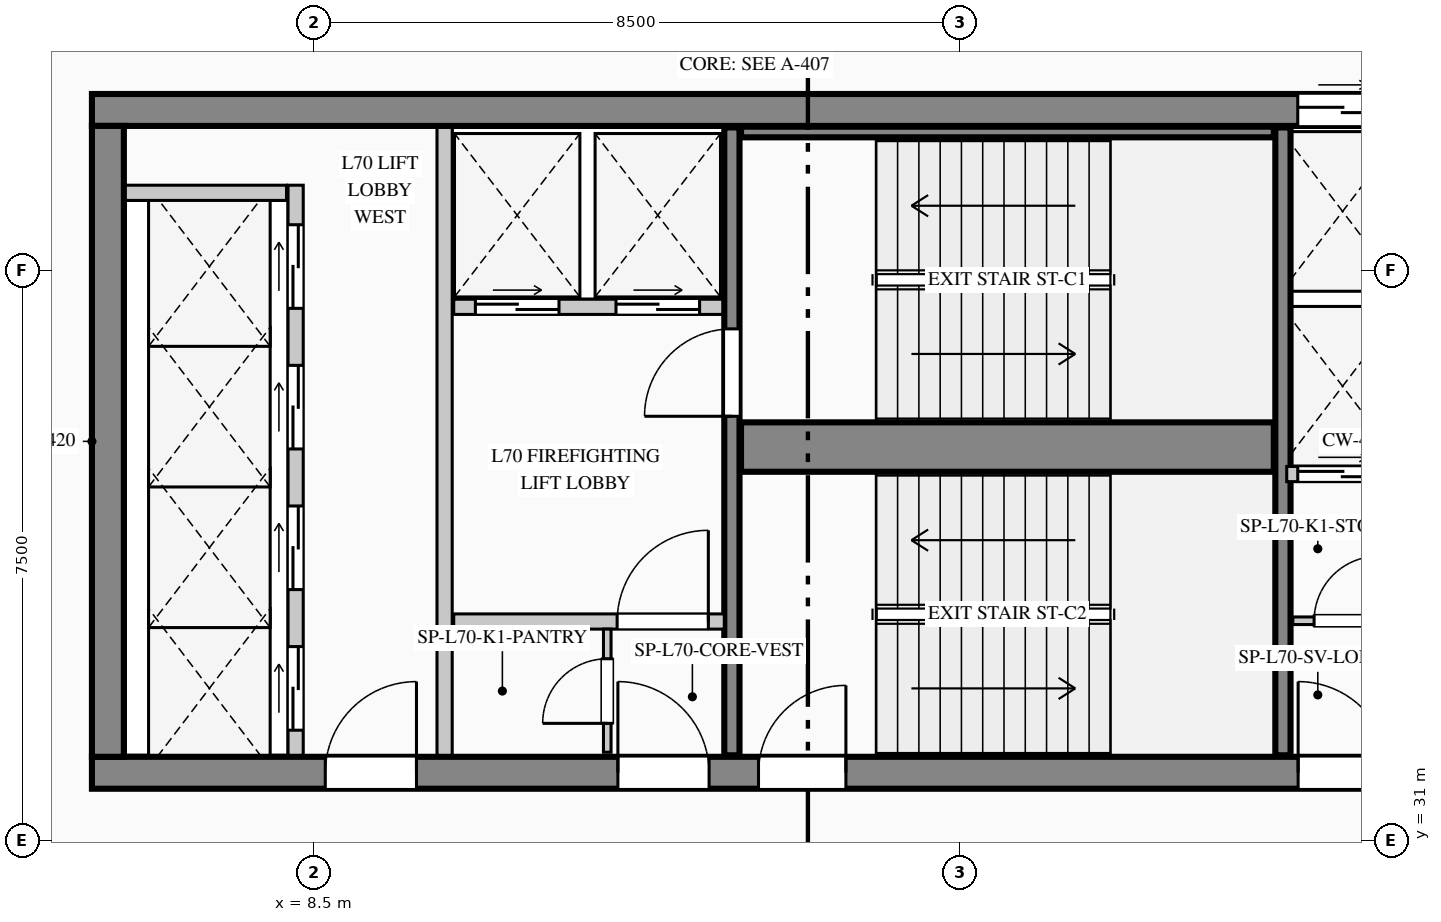
"""IFC4 building model, lengths in metres.
Left out: names, types, materials, properties, quantities, classifications, styles, units other than length and angle.
Written with IfcOpenShell. Run it as: python <this file> out.ifc"""

import sys

from ifc_helpers import new_model, si_unit, direction, frame, frame_2d, origin, place, context, subcontext, project, spatial, rectangle, extrude, element, fill, save


model = new_model("IFC4")
c1 = context("Model", 3, precision=1e-05, world=origin(), true_north=direction((0.0, 1.0)))
c2 = subcontext(c1, "Body", "Model", "MODEL_VIEW")
j1 = project(units=[si_unit("LENGTHUNIT", "METRE"), si_unit("PLANEANGLEUNIT", "RADIAN")], contexts=[c1])
p1 = place(None, origin())
s1 = spatial("IfcSite", under=j1, at=p1, CompositionType="ELEMENT")
p2 = place(p1, origin())
s2 = spatial("IfcBuilding", under=s1, at=p2, CompositionType="ELEMENT")
p3 = place(p2, frame((0.0, 0.0, 292.25)))
s3 = spatial("IfcBuildingStorey", under=s2, at=p3, CompositionType="ELEMENT", Elevation=292.25)
p4 = place(p3, frame((5.58, 40.61, 0.0), z_axis=(0.0, 0.0, 1.0), x_axis=(1.0, 0.0, 0.0)))
e1 = element("IfcWall", 1, at=p4, inside=s3, PredefinedType="SHEAR", context=c2, shape_type="SweptSolid", body=[
    extrude(rectangle(XDim=17.69, YDim=0.42, at=frame_2d((8.845, 0.0))), origin(), (0.0, 0.0, 1.0), 3.95),
])
p5 = place(p4, frame((15.865, 0.0, 0.0)))
e2 = element("IfcOpeningElement", 2, at=p5, cuts=e1, PredefinedType="OPENING", context=c2, shape_type="SweptSolid", body=[
    extrude(rectangle(XDim=1.18, YDim=2.25, at=frame_2d((0.59, 1.125))), frame((0.0, 0.22, 0.0), z_axis=(0.0, -1.0, 0.0), x_axis=(1.0, 0.0, 0.0)), (0.0, 0.0, 1.0), 0.44),
])
p6 = place(p3, frame((5.58, 31.89, 0.0), z_axis=(0.0, 0.0, 1.0), x_axis=(1.0, 0.0, 0.0)))
e3 = element("IfcWall", 3, at=p6, inside=s3, PredefinedType="SHEAR", context=c2, shape_type="SweptSolid", body=[
    extrude(rectangle(XDim=17.69, YDim=0.42, at=frame_2d((8.845, 0.0))), origin(), (0.0, 0.0, 1.0), 3.95),
])
p7 = place(p6, frame((3.07, 0.0, 0.0)))
e4 = element("IfcOpeningElement", 4, at=p7, cuts=e3, PredefinedType="OPENING", context=c2, shape_type="SweptSolid", body=[
    extrude(rectangle(XDim=1.2, YDim=2.2, at=frame_2d((0.6, 1.1))), frame((0.0, 0.22, 0.0), z_axis=(0.0, -1.0, 0.0), x_axis=(1.0, 0.0, 0.0)), (0.0, 0.0, 1.0), 0.44),
])
p8 = place(p6, frame((6.92, 0.0, 0.0)))
e5 = element("IfcOpeningElement", 5, at=p8, cuts=e3, PredefinedType="OPENING", context=c2, shape_type="SweptSolid", body=[
    extrude(rectangle(XDim=1.2, YDim=2.2, at=frame_2d((0.6, 1.1))), frame((0.0, 0.22, 0.0), z_axis=(0.0, -1.0, 0.0), x_axis=(1.0, 0.0, 0.0)), (0.0, 0.0, 1.0), 0.44),
])
p9 = place(p6, frame((8.77, 0.0, 0.0)))
e6 = element("IfcOpeningElement", 6, at=p9, cuts=e3, PredefinedType="OPENING", context=c2, shape_type="SweptSolid", body=[
    extrude(rectangle(XDim=1.15, YDim=2.2, at=frame_2d((0.575, 1.1))), frame((0.0, 0.22, 0.0), z_axis=(0.0, -1.0, 0.0), x_axis=(1.0, 0.0, 0.0)), (0.0, 0.0, 1.0), 0.44),
])
p10 = place(p6, frame((15.87, 0.0, 0.0)))
e7 = element("IfcOpeningElement", 7, at=p10, cuts=e3, PredefinedType="OPENING", context=c2, shape_type="SweptSolid", body=[
    extrude(rectangle(XDim=1.2, YDim=2.2, at=frame_2d((0.6, 1.1))), frame((0.0, 0.22, 0.0), z_axis=(0.0, -1.0, 0.0), x_axis=(1.0, 0.0, 0.0)), (0.0, 0.0, 1.0), 0.44),
])
p11 = place(p3, frame((5.79, 32.1, 0.0), z_axis=(0.0, 0.0, 1.0), x_axis=(0.0, 1.0, 0.0)))
e8 = element("IfcWall", 8, at=p11, inside=s3, PredefinedType="SHEAR", context=c2, shape_type="SweptSolid", body=[
    extrude(rectangle(XDim=8.3, YDim=0.42, at=frame_2d((4.15, 0.0))), origin(), (0.0, 0.0, 1.0), 3.95),
])
p12 = place(p3, frame((14.0, 32.12, 0.0), z_axis=(0.0, 0.0, 1.0), x_axis=(0.0, 1.0, 0.0)))
e9 = element("IfcWall", 9, at=p12, inside=s3, PredefinedType="SHEAR", context=c2, shape_type="SweptSolid", body=[
    extrude(rectangle(XDim=8.26, YDim=0.2, at=frame_2d((4.13, 0.0))), origin(), (0.0, 0.0, 1.0), 3.95),
])
p13 = place(p12, frame((4.46, 0.0, 0.0)))
e10 = element("IfcOpeningElement", 10, at=p13, cuts=e9, PredefinedType="OPENING", context=c2, shape_type="SweptSolid", body=[
    extrude(rectangle(XDim=1.15, YDim=2.2, at=frame_2d((0.575, 1.1))), frame((0.0, 0.11, 0.0), z_axis=(0.0, -1.0, 0.0), x_axis=(1.0, 0.0, 0.0)), (0.0, 0.0, 1.0), 0.22),
])
p14 = place(p3, frame((14.12, 36.175, 0.0), z_axis=(0.0, 0.0, 1.0), x_axis=(1.0, 0.0, 0.0)))
e11 = element("IfcWall", 11, at=p14, inside=s3, PredefinedType="SHEAR", context=c2, shape_type="SweptSolid", body=[
    extrude(rectangle(XDim=7.01, YDim=0.65, at=frame_2d((3.505, 0.0))), origin(), (0.0, 0.0, 1.0), 3.95),
])
p15 = place(p3, frame((21.25, 32.12, 0.0), z_axis=(0.0, 0.0, 1.0), x_axis=(0.0, 1.0, 0.0)))
e12 = element("IfcWall", 12, at=p15, inside=s3, PredefinedType="SHEAR", context=c2, shape_type="SweptSolid", body=[
    extrude(rectangle(XDim=8.26, YDim=0.2, at=frame_2d((4.13, 0.0))), origin(), (0.0, 0.0, 1.0), 3.95),
])
p16 = place(p3, frame((14.12, 40.32, 0.0), z_axis=(0.0, 0.0, 1.0), x_axis=(1.0, 0.0, 0.0)))
e13 = element("IfcWall", 13, at=p16, inside=s3, PredefinedType="SHEAR", context=c2, shape_type="SweptSolid", body=[
    extrude(rectangle(XDim=7.01, YDim=0.14, at=frame_2d((3.505, 0.0))), origin(), (0.0, 0.0, 1.0), 3.95),
])
p17 = place(p3, frame((5.6, 4.32, 0.0), z_axis=(0.0, 0.0, 1.0), x_axis=(-0.075839920993, 0.997120006009, 0.0)))
e14 = element("IfcWall", 14, at=p17, inside=s3, PredefinedType="STANDARD", context=c2, shape_type="SweptSolid", body=[
    extrude(rectangle(XDim=37.468, YDim=0.24, at=frame_2d((18.734, 0.0))), origin(), (0.0, 0.0, 1.0), 3.7),
])
p18 = place(p17, frame((23.154, 0.0, 0.9)))
e15 = element("IfcOpeningElement", 15, at=p18, cuts=e14, PredefinedType="OPENING", context=c2, shape_type="SweptSolid", body=[
    extrude(rectangle(XDim=1.65, YDim=1.95, at=frame_2d((0.825, 0.975))), frame((0.0, 0.13, 0.0), z_axis=(0.0, -1.0, 0.0), x_axis=(1.0, 0.0, 0.0)), (0.0, 0.0, 1.0), 0.26),
])
p19 = place(p3, frame((8.26, 32.12, 0.0), z_axis=(0.0, 0.0, 1.0), x_axis=(0.0, 1.0, 0.0)))
e16 = element("IfcWall", 16, at=p19, inside=s3, PredefinedType="PARTITIONING", context=c2, shape_type="SweptSolid", body=[
    extrude(rectangle(XDim=7.5, YDim=0.2, at=frame_2d((3.75, 0.0))), origin(), (0.0, 0.0, 1.0), 3.7),
])
p20 = place(p19, frame((0.33, 0.0, 0.0)))
e17 = element("IfcOpeningElement", 17, at=p20, cuts=e16, PredefinedType="OPENING", context=c2, shape_type="SweptSolid", body=[
    extrude(rectangle(XDim=1.1, YDim=2.2, at=frame_2d((0.55, 1.1))), frame((0.0, 0.11, 0.0), z_axis=(0.0, -1.0, 0.0), x_axis=(1.0, 0.0, 0.0)), (0.0, 0.0, 1.0), 0.22),
])
p21 = place(p19, frame((2.18, 0.0, 0.0)))
e18 = element("IfcOpeningElement", 18, at=p21, cuts=e16, PredefinedType="OPENING", context=c2, shape_type="SweptSolid", body=[
    extrude(rectangle(XDim=1.1, YDim=2.2, at=frame_2d((0.55, 1.1))), frame((0.0, 0.11, 0.0), z_axis=(0.0, -1.0, 0.0), x_axis=(1.0, 0.0, 0.0)), (0.0, 0.0, 1.0), 0.22),
])
p22 = place(p19, frame((4.03, 0.0, 0.0)))
e19 = element("IfcOpeningElement", 19, at=p22, cuts=e16, PredefinedType="OPENING", context=c2, shape_type="SweptSolid", body=[
    extrude(rectangle(XDim=1.1, YDim=2.2, at=frame_2d((0.55, 1.1))), frame((0.0, 0.11, 0.0), z_axis=(0.0, -1.0, 0.0), x_axis=(1.0, 0.0, 0.0)), (0.0, 0.0, 1.0), 0.22),
])
p23 = place(p19, frame((5.88, 0.0, 0.0)))
e20 = element("IfcOpeningElement", 20, at=p23, cuts=e16, PredefinedType="OPENING", context=c2, shape_type="SweptSolid", body=[
    extrude(rectangle(XDim=1.1, YDim=2.2, at=frame_2d((0.55, 1.1))), frame((0.0, 0.11, 0.0), z_axis=(0.0, -1.0, 0.0), x_axis=(1.0, 0.0, 0.0)), (0.0, 0.0, 1.0), 0.22),
])
p24 = place(p3, frame((6.02, 39.52, 0.0), z_axis=(0.0, 0.0, 1.0), x_axis=(1.0, 0.0, 0.0)))
e21 = element("IfcWall", 21, at=p24, inside=s3, PredefinedType="PARTITIONING", context=c2, shape_type="SweptSolid", body=[
    extrude(rectangle(XDim=2.12, YDim=0.2, at=frame_2d((1.06, 0.0))), origin(), (0.0, 0.0, 1.0), 3.7),
])
p25 = place(p3, frame((10.22, 32.12, 0.0), z_axis=(0.0, 0.0, 1.0), x_axis=(0.0, 1.0, 0.0)))
e22 = element("IfcWall", 22, at=p25, inside=s3, PredefinedType="PARTITIONING", context=c2, shape_type="SweptSolid", body=[
    extrude(rectangle(XDim=8.26, YDim=0.2, at=frame_2d((4.13, 0.0))), origin(), (0.0, 0.0, 1.0), 3.7),
])
p26 = place(p3, frame((10.34, 38.02, 0.0), z_axis=(0.0, 0.0, 1.0), x_axis=(1.0, 0.0, 0.0)))
e23 = element("IfcWall", 23, at=p26, inside=s3, PredefinedType="PARTITIONING", context=c2, shape_type="SweptSolid", body=[
    extrude(rectangle(XDim=3.54, YDim=0.2, at=frame_2d((1.77, 0.0))), origin(), (0.0, 0.0, 1.0), 3.7),
])
p27 = place(p26, frame((0.285, 0.0, 0.0)))
e24 = element("IfcOpeningElement", 24, at=p27, cuts=e23, PredefinedType="OPENING", context=c2, shape_type="SweptSolid", body=[
    extrude(rectangle(XDim=1.1, YDim=2.2, at=frame_2d((0.55, 1.1))), frame((0.0, 0.11, 0.0), z_axis=(0.0, -1.0, 0.0), x_axis=(1.0, 0.0, 0.0)), (0.0, 0.0, 1.0), 0.22),
])
p28 = place(p26, frame((2.135, 0.0, 0.0)))
e25 = element("IfcOpeningElement", 25, at=p28, cuts=e23, PredefinedType="OPENING", context=c2, shape_type="SweptSolid", body=[
    extrude(rectangle(XDim=1.1, YDim=2.2, at=frame_2d((0.55, 1.1))), frame((0.0, 0.11, 0.0), z_axis=(0.0, -1.0, 0.0), x_axis=(1.0, 0.0, 0.0)), (0.0, 0.0, 1.0), 0.22),
])
p29 = place(p3, frame((10.34, 33.88, 0.0), z_axis=(0.0, 0.0, 1.0), x_axis=(1.0, 0.0, 0.0)))
e26 = element("IfcWall", 26, at=p29, inside=s3, PredefinedType="PARTITIONING", context=c2, shape_type="SweptSolid", body=[
    extrude(rectangle(XDim=3.56, YDim=0.2, at=frame_2d((1.78, 0.0))), origin(), (0.0, 0.0, 1.0), 3.7),
])
p30 = place(p29, frame((2.15, 0.0, 0.0)))
e27 = element("IfcOpeningElement", 27, at=p30, cuts=e26, PredefinedType="OPENING", context=c2, shape_type="SweptSolid", body=[
    extrude(rectangle(XDim=1.2, YDim=2.2, at=frame_2d((0.6, 1.1))), frame((0.0, 0.11, 0.0), z_axis=(0.0, -1.0, 0.0), x_axis=(1.0, 0.0, 0.0)), (0.0, 0.0, 1.0), 0.22),
])
p31 = place(p3, frame((12.36, 32.16, 0.0), z_axis=(0.0, 0.0, 1.0), x_axis=(0.0, 1.0, 0.0)))
e28 = element("IfcWall", 28, at=p31, inside=s3, PredefinedType="PARTITIONING", context=c2, shape_type="SweptSolid", body=[
    extrude(rectangle(XDim=1.62, YDim=0.1, at=frame_2d((0.81, 0.0))), origin(), (0.0, 0.0, 1.0), 3.7),
])
p32 = place(p31, frame((0.38, 0.0, 0.0)))
e29 = element("IfcOpeningElement", 29, at=p32, cuts=e28, PredefinedType="OPENING", context=c2, shape_type="SweptSolid", body=[
    extrude(rectangle(XDim=0.85, YDim=2.1, at=frame_2d((0.425, 1.05))), frame((0.0, 0.06, 0.0), z_axis=(0.0, -1.0, 0.0), x_axis=(1.0, 0.0, 0.0)), (0.0, 0.0, 1.0), 0.12),
])
p33 = place(p3, frame((21.38, 33.89, 0.0), z_axis=(0.0, 0.0, 1.0), x_axis=(1.0, 0.0, 0.0)))
e30 = element("IfcWall", 30, at=p33, inside=s3, PredefinedType="PARTITIONING", context=c2, shape_type="SweptSolid", body=[
    extrude(rectangle(XDim=1.42, YDim=0.1, at=frame_2d((0.71, 0.0))), origin(), (0.0, 0.0, 1.0), 3.7),
])
p34 = place(p33, frame((0.28, 0.0, 0.0)))
e31 = element("IfcOpeningElement", 31, at=p34, cuts=e30, PredefinedType="OPENING", context=c2, shape_type="SweptSolid", body=[
    extrude(rectangle(XDim=0.85, YDim=2.1, at=frame_2d((0.425, 1.05))), frame((0.0, 0.06, 0.0), z_axis=(0.0, -1.0, 0.0), x_axis=(1.0, 0.0, 0.0)), (0.0, 0.0, 1.0), 0.12),
])
p35 = place(p3, frame((21.3, 35.82, 0.0), z_axis=(0.0, 0.0, 1.0), x_axis=(1.0, 0.0, 0.0)))
e32 = element("IfcWall", 32, at=p35, inside=s3, PredefinedType="PARTITIONING", context=c2, shape_type="SweptSolid", body=[
    extrude(rectangle(XDim=1.5, YDim=0.2, at=frame_2d((0.75, 0.0))), origin(), (0.0, 0.0, 1.0), 3.7),
])
p36 = place(p35, frame((0.145, 0.0, 0.0)))
e33 = element("IfcOpeningElement", 33, at=p36, cuts=e32, PredefinedType="OPENING", context=c2, shape_type="SweptSolid", body=[
    extrude(rectangle(XDim=1.18, YDim=2.25, at=frame_2d((0.59, 1.125))), frame((0.0, 0.11, 0.0), z_axis=(0.0, -1.0, 0.0), x_axis=(1.0, 0.0, 0.0)), (0.0, 0.0, 1.0), 0.22),
])
p37 = place(p7, origin())
e34 = element("IfcDoor", 34, at=p37, inside=s3, OperationType="SINGLE_SWING_RIGHT", PredefinedType="DOOR", context=c2, shape_type="SweptSolid", body=[
    extrude(rectangle(XDim=1.2, YDim=2.2, at=frame_2d((0.6, 1.1))), frame((0.0, 0.025, 0.0), z_axis=(0.0, -1.0, 0.0), x_axis=(1.0, 0.0, 0.0)), (0.0, 0.0, 1.0), 0.05),
])
fill(e4, e34)
p38 = place(p8, origin())
e35 = element("IfcDoor", 35, at=p38, inside=s3, OperationType="SINGLE_SWING_LEFT", PredefinedType="DOOR", context=c2, shape_type="SweptSolid", body=[
    extrude(rectangle(XDim=1.2, YDim=2.2, at=frame_2d((0.6, 1.1))), frame((0.0, 0.025, 0.0), z_axis=(0.0, -1.0, 0.0), x_axis=(1.0, 0.0, 0.0)), (0.0, 0.0, 1.0), 0.05),
])
fill(e5, e35)
p39 = place(p9, origin())
e36 = element("IfcDoor", 36, at=p39, inside=s3, OperationType="SINGLE_SWING_RIGHT", PredefinedType="DOOR", context=c2, shape_type="SweptSolid", body=[
    extrude(rectangle(XDim=1.15, YDim=2.2, at=frame_2d((0.575, 1.1))), frame((0.0, 0.025, 0.0), z_axis=(0.0, -1.0, 0.0), x_axis=(1.0, 0.0, 0.0)), (0.0, 0.0, 1.0), 0.05),
])
fill(e6, e36)
p40 = place(p10, origin())
e37 = element("IfcDoor", 37, at=p40, inside=s3, OperationType="SINGLE_SWING_LEFT", PredefinedType="DOOR", context=c2, shape_type="SweptSolid", body=[
    extrude(rectangle(XDim=1.2, YDim=2.2, at=frame_2d((0.6, 1.1))), frame((0.0, 0.025, 0.0), z_axis=(0.0, -1.0, 0.0), x_axis=(1.0, 0.0, 0.0)), (0.0, 0.0, 1.0), 0.05),
])
fill(e7, e37)
p41 = place(p30, origin())
e38 = element("IfcDoor", 38, at=p41, inside=s3, OperationType="SINGLE_SWING_RIGHT", PredefinedType="DOOR", context=c2, shape_type="SweptSolid", body=[
    extrude(rectangle(XDim=1.2, YDim=2.2, at=frame_2d((0.6, 1.1))), frame((0.0, 0.025, 0.0), z_axis=(0.0, -1.0, 0.0), x_axis=(1.0, 0.0, 0.0)), (0.0, 0.0, 1.0), 0.05),
])
fill(e27, e38)
p42 = place(p32, origin())
e39 = element("IfcDoor", 39, at=p42, inside=s3, OperationType="SINGLE_SWING_LEFT", PredefinedType="DOOR", context=c2, shape_type="SweptSolid", body=[
    extrude(rectangle(XDim=0.85, YDim=2.1, at=frame_2d((0.425, 1.05))), frame((0.0, 0.025, 0.0), z_axis=(0.0, -1.0, 0.0), x_axis=(1.0, 0.0, 0.0)), (0.0, 0.0, 1.0), 0.05),
])
fill(e29, e39)
p43 = place(p34, origin())
e40 = element("IfcDoor", 40, at=p43, inside=s3, OperationType="SINGLE_SWING_RIGHT", PredefinedType="DOOR", context=c2, shape_type="SweptSolid", body=[
    extrude(rectangle(XDim=0.85, YDim=2.1, at=frame_2d((0.425, 1.05))), frame((0.0, 0.025, 0.0), z_axis=(0.0, -1.0, 0.0), x_axis=(1.0, 0.0, 0.0)), (0.0, 0.0, 1.0), 0.05),
])
fill(e31, e40)
p44 = place(p13, origin())
e41 = element("IfcDoor", 41, at=p44, inside=s3, OperationType="SINGLE_SWING_LEFT", PredefinedType="DOOR", context=c2, shape_type="SweptSolid", body=[
    extrude(rectangle(XDim=1.15, YDim=2.2, at=frame_2d((0.575, 1.1))), frame((0.0, 0.025, 0.0), z_axis=(0.0, -1.0, 0.0), x_axis=(1.0, 0.0, 0.0)), (0.0, 0.0, 1.0), 0.05),
])
fill(e10, e41)
p45 = place(p20, origin())
e42 = element("IfcDoor", 42, at=p45, inside=s3, OperationType="DOUBLE_DOOR_SLIDING", PredefinedType="DOOR", context=c2, shape_type="SweptSolid", body=[
    extrude(rectangle(XDim=1.1, YDim=2.2, at=frame_2d((0.55, 1.1))), frame((0.0, 0.025, 0.0), z_axis=(0.0, -1.0, 0.0), x_axis=(1.0, 0.0, 0.0)), (0.0, 0.0, 1.0), 0.05),
])
fill(e17, e42)
p46 = place(p21, origin())
e43 = element("IfcDoor", 43, at=p46, inside=s3, OperationType="DOUBLE_DOOR_SLIDING", PredefinedType="DOOR", context=c2, shape_type="SweptSolid", body=[
    extrude(rectangle(XDim=1.1, YDim=2.2, at=frame_2d((0.55, 1.1))), frame((0.0, 0.025, 0.0), z_axis=(0.0, -1.0, 0.0), x_axis=(1.0, 0.0, 0.0)), (0.0, 0.0, 1.0), 0.05),
])
fill(e18, e43)
p47 = place(p22, origin())
e44 = element("IfcDoor", 44, at=p47, inside=s3, OperationType="DOUBLE_DOOR_SLIDING", PredefinedType="DOOR", context=c2, shape_type="SweptSolid", body=[
    extrude(rectangle(XDim=1.1, YDim=2.2, at=frame_2d((0.55, 1.1))), frame((0.0, 0.025, 0.0), z_axis=(0.0, -1.0, 0.0), x_axis=(1.0, 0.0, 0.0)), (0.0, 0.0, 1.0), 0.05),
])
fill(e19, e44)
p48 = place(p23, origin())
e45 = element("IfcDoor", 45, at=p48, inside=s3, OperationType="DOUBLE_DOOR_SLIDING", PredefinedType="DOOR", context=c2, shape_type="SweptSolid", body=[
    extrude(rectangle(XDim=1.1, YDim=2.2, at=frame_2d((0.55, 1.1))), frame((0.0, 0.025, 0.0), z_axis=(0.0, -1.0, 0.0), x_axis=(1.0, 0.0, 0.0)), (0.0, 0.0, 1.0), 0.05),
])
fill(e20, e45)
p49 = place(p27, origin())
e46 = element("IfcDoor", 46, at=p49, inside=s3, OperationType="DOUBLE_DOOR_SLIDING", PredefinedType="DOOR", context=c2, shape_type="SweptSolid", body=[
    extrude(rectangle(XDim=1.1, YDim=2.2, at=frame_2d((0.55, 1.1))), frame((0.0, 0.025, 0.0), z_axis=(0.0, -1.0, 0.0), x_axis=(1.0, 0.0, 0.0)), (0.0, 0.0, 1.0), 0.05),
])
fill(e24, e46)
p50 = place(p28, origin())
e47 = element("IfcDoor", 47, at=p50, inside=s3, OperationType="DOUBLE_DOOR_SLIDING", PredefinedType="DOOR", context=c2, shape_type="SweptSolid", body=[
    extrude(rectangle(XDim=1.1, YDim=2.2, at=frame_2d((0.55, 1.1))), frame((0.0, 0.025, 0.0), z_axis=(0.0, -1.0, 0.0), x_axis=(1.0, 0.0, 0.0)), (0.0, 0.0, 1.0), 0.05),
])
fill(e25, e47)
p51 = place(p5, origin())
e48 = element("IfcDoor", 48, at=p51, inside=s3, OperationType="DOUBLE_DOOR_SLIDING", PredefinedType="DOOR", context=c2, shape_type="SweptSolid", body=[
    extrude(rectangle(XDim=1.18, YDim=2.25, at=frame_2d((0.59, 1.125))), frame((0.0, 0.025, 0.0), z_axis=(0.0, -1.0, 0.0), x_axis=(1.0, 0.0, 0.0)), (0.0, 0.0, 1.0), 0.05),
])
fill(e2, e48)
p52 = place(p36, origin())
e49 = element("IfcDoor", 49, at=p52, inside=s3, OperationType="DOUBLE_DOOR_SLIDING", PredefinedType="DOOR", context=c2, shape_type="SweptSolid", body=[
    extrude(rectangle(XDim=1.18, YDim=2.25, at=frame_2d((0.59, 1.125))), frame((0.0, 0.025, 0.0), z_axis=(0.0, -1.0, 0.0), x_axis=(1.0, 0.0, 0.0)), (0.0, 0.0, 1.0), 0.05),
])
fill(e33, e49)
save(model, sys.argv[1])
